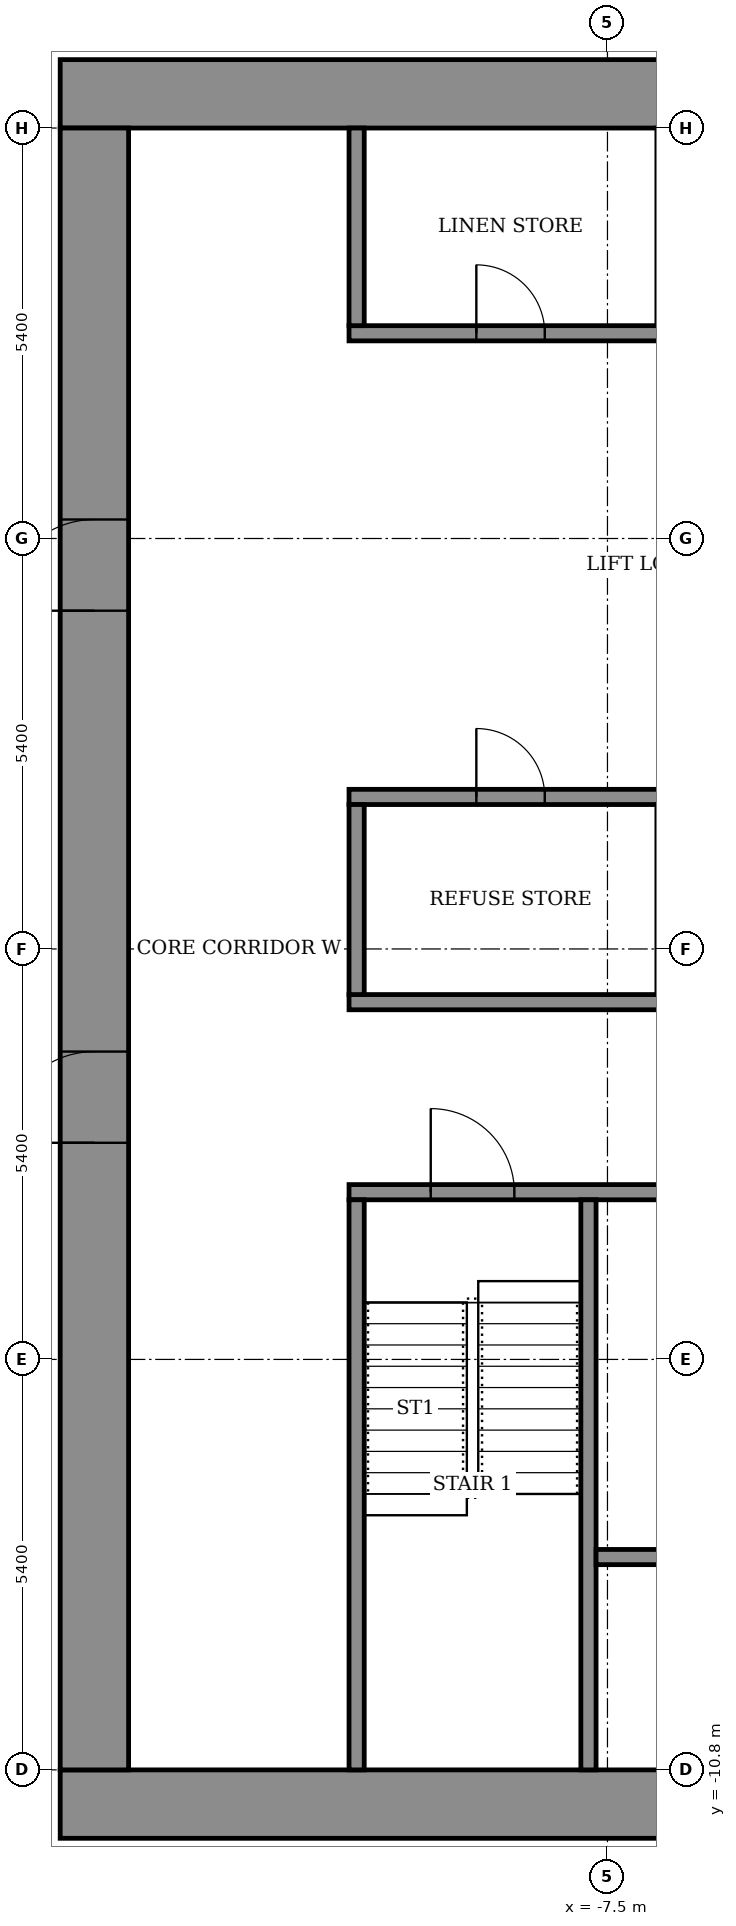
"""IFC4 building model, lengths in metres.
Left out: names, types, materials, properties, quantities, classifications, styles, units other than length and angle.
Written with IfcOpenShell. Run it as: python <this file> out.ifc"""

import sys

from ifc_helpers import new_model, si_unit, direction, frame, frame_2d, origin, place, context, subcontext, project, spatial, rectangle, extrude, element, fill, save


model = new_model("IFC4")
c1 = context("Model", 3, precision=1e-05, world=origin(), true_north=direction((0.0, 1.0)))
c2 = subcontext(c1, "Body", "Model", "MODEL_VIEW")
j1 = project(units=[si_unit("LENGTHUNIT", "METRE"), si_unit("PLANEANGLEUNIT", "RADIAN")], contexts=[c1])
p1 = place(None, origin())
s1 = spatial("IfcSite", under=j1, at=p1, CompositionType="ELEMENT")
p2 = place(p1, origin())
s2 = spatial("IfcBuilding", under=s1, at=p2, CompositionType="ELEMENT")
p3 = place(p2, frame((0.0, 0.0, 140.9)))
s3 = spatial("IfcBuildingStorey", under=s2, at=p3, CompositionType="ELEMENT", Elevation=140.9)
for number, where, z_axis, x_axis in (
    (1, (-14.7, -11.25, 0.0), (0.0, 0.0, 1.0), (1.0, 0.0, 0.0)),
    (2, (-14.7, 11.25, 0.0), (0.0, 0.0, 1.0), (1.0, 0.0, 0.0)),
):
    element("IfcWall", number, at=place(p3, frame(where, z_axis=z_axis, x_axis=x_axis)), inside=s3, PredefinedType="SHEAR", context=c2, shape_type="SweptSolid", body=[
        extrude(rectangle(XDim=29.4, YDim=0.9, at=frame_2d((14.7, 0.0))), origin(), (0.0, 0.0, 1.0), 3.6),
    ])
p4 = place(p3, frame((-14.25, -10.8, 0.0), z_axis=(0.0, 0.0, 1.0), x_axis=(0.0, 1.0, 0.0)))
e3 = element("IfcWall", 3, at=p4, inside=s3, PredefinedType="SHEAR", context=c2, shape_type="SweptSolid", body=[
    extrude(rectangle(XDim=21.6, YDim=0.9, at=frame_2d((10.8, 0.0))), origin(), (0.0, 0.0, 1.0), 3.6),
])
p5 = place(p4, frame((8.25, 0.0, 0.0)))
e4 = element("IfcOpeningElement", 4, at=p5, cuts=e3, PredefinedType="OPENING", context=c2, shape_type="SweptSolid", body=[
    extrude(rectangle(XDim=1.2, YDim=2.1, at=frame_2d((0.6, 1.05))), frame((0.0, 0.46, 0.0), z_axis=(0.0, -1.0, 0.0), x_axis=(1.0, 0.0, 0.0)), (0.0, 0.0, 1.0), 0.92),
])
p6 = place(p4, frame((15.25, 0.0, 0.0)))
e5 = element("IfcOpeningElement", 5, at=p6, cuts=e3, PredefinedType="OPENING", context=c2, shape_type="SweptSolid", body=[
    extrude(rectangle(XDim=1.2, YDim=2.1, at=frame_2d((0.6, 1.05))), frame((0.0, 0.46, 0.0), z_axis=(0.0, -1.0, 0.0), x_axis=(1.0, 0.0, 0.0)), (0.0, 0.0, 1.0), 0.92),
])
p7 = place(p3, frame((-10.9, -3.2, 0.0), z_axis=(0.0, 0.0, 1.0), x_axis=(1.0, 0.0, 0.0)))
e6 = element("IfcWall", 6, at=p7, inside=s3, PredefinedType="SHEAR", context=c2, shape_type="SweptSolid", body=[
    extrude(rectangle(XDim=21.8, YDim=0.2, at=frame_2d((10.9, 0.0))), origin(), (0.0, 0.0, 1.0), 3.05),
])
p8 = place(p7, frame((1.075, 0.0, 0.0)))
e7 = element("IfcOpeningElement", 7, at=p8, cuts=e6, PredefinedType="OPENING", context=c2, shape_type="SweptSolid", body=[
    extrude(rectangle(XDim=1.1, YDim=2.1, at=frame_2d((0.55, 1.05))), frame((0.0, 0.11, 0.0), z_axis=(0.0, -1.0, 0.0), x_axis=(1.0, 0.0, 0.0)), (0.0, 0.0, 1.0), 0.22),
])
p9 = place(p7, frame((10.325, 0.0, 0.0)))
e8 = element("IfcOpeningElement", 8, at=p9, cuts=e6, PredefinedType="OPENING", context=c2, shape_type="SweptSolid", body=[
    extrude(rectangle(XDim=1.1, YDim=2.1, at=frame_2d((0.55, 1.05))), frame((0.0, 0.11, 0.0), z_axis=(0.0, -1.0, 0.0), x_axis=(1.0, 0.0, 0.0)), (0.0, 0.0, 1.0), 0.22),
])
p10 = place(p7, frame((19.625, 0.0, 0.0)))
e9 = element("IfcOpeningElement", 9, at=p10, cuts=e6, PredefinedType="OPENING", context=c2, shape_type="SweptSolid", body=[
    extrude(rectangle(XDim=1.1, YDim=2.1, at=frame_2d((0.55, 1.05))), frame((0.0, 0.11, 0.0), z_axis=(0.0, -1.0, 0.0), x_axis=(1.0, 0.0, 0.0)), (0.0, 0.0, 1.0), 0.22),
])
p11 = place(p7, frame((5.7, 0.0, 0.0)))
e10 = element("IfcOpeningElement", 10, at=p11, cuts=e6, PredefinedType="OPENING", context=c2, shape_type="SweptSolid", body=[
    extrude(rectangle(XDim=1.1, YDim=2.1, at=frame_2d((0.55, 1.05))), frame((0.0, 0.11, 0.0), z_axis=(0.0, -1.0, 0.0), x_axis=(1.0, 0.0, 0.0)), (0.0, 0.0, 1.0), 0.22),
])
p12 = place(p7, frame((14.975, 0.0, 0.0)))
e11 = element("IfcOpeningElement", 11, at=p12, cuts=e6, PredefinedType="OPENING", context=c2, shape_type="SweptSolid", body=[
    extrude(rectangle(XDim=1.1, YDim=2.1, at=frame_2d((0.55, 1.05))), frame((0.0, 0.11, 0.0), z_axis=(0.0, -1.0, 0.0), x_axis=(1.0, 0.0, 0.0)), (0.0, 0.0, 1.0), 0.22),
])
p13 = place(p3, frame((-10.9, -0.7, 0.0), z_axis=(0.0, 0.0, 1.0), x_axis=(1.0, 0.0, 0.0)))
e12 = element("IfcWall", 12, at=p13, inside=s3, PredefinedType="SHEAR", context=c2, shape_type="SweptSolid", body=[
    extrude(rectangle(XDim=21.8, YDim=0.2, at=frame_2d((10.9, 0.0))), origin(), (0.0, 0.0, 1.0), 3.05),
])
p14 = place(p3, frame((-10.9, 2.0, 0.0), z_axis=(0.0, 0.0, 1.0), x_axis=(1.0, 0.0, 0.0)))
e13 = element("IfcWall", 13, at=p14, inside=s3, PredefinedType="SHEAR", context=c2, shape_type="SweptSolid", body=[
    extrude(rectangle(XDim=21.8, YDim=0.2, at=frame_2d((10.9, 0.0))), origin(), (0.0, 0.0, 1.0), 3.05),
])
p15 = place(p14, frame((14.4, 0.0, 0.0)))
e14 = element("IfcOpeningElement", 14, at=p15, cuts=e13, PredefinedType="OPENING", context=c2, shape_type="SweptSolid", body=[
    extrude(rectangle(XDim=1.1, YDim=2.1, at=frame_2d((0.55, 1.05))), frame((0.0, 0.11, 0.0), z_axis=(0.0, -1.0, 0.0), x_axis=(1.0, 0.0, 0.0)), (0.0, 0.0, 1.0), 0.22),
])
p16 = place(p14, frame((17.1, 0.0, 0.0)))
e15 = element("IfcOpeningElement", 15, at=p16, cuts=e13, PredefinedType="OPENING", context=c2, shape_type="SweptSolid", body=[
    extrude(rectangle(XDim=1.1, YDim=2.1, at=frame_2d((0.55, 1.05))), frame((0.0, 0.11, 0.0), z_axis=(0.0, -1.0, 0.0), x_axis=(1.0, 0.0, 0.0)), (0.0, 0.0, 1.0), 0.22),
])
p17 = place(p14, frame((19.8, 0.0, 0.0)))
e16 = element("IfcOpeningElement", 16, at=p17, cuts=e13, PredefinedType="OPENING", context=c2, shape_type="SweptSolid", body=[
    extrude(rectangle(XDim=1.1, YDim=2.1, at=frame_2d((0.55, 1.05))), frame((0.0, 0.11, 0.0), z_axis=(0.0, -1.0, 0.0), x_axis=(1.0, 0.0, 0.0)), (0.0, 0.0, 1.0), 0.22),
])
p18 = place(p14, frame((1.675, 0.0, 0.0)))
e17 = element("IfcOpeningElement", 17, at=p18, cuts=e13, PredefinedType="OPENING", context=c2, shape_type="SweptSolid", body=[
    extrude(rectangle(XDim=0.9, YDim=2.1, at=frame_2d((0.45, 1.05))), frame((0.0, 0.11, 0.0), z_axis=(0.0, -1.0, 0.0), x_axis=(1.0, 0.0, 0.0)), (0.0, 0.0, 1.0), 0.22),
])
p19 = place(p14, frame((8.425, 0.0, 0.0)))
e18 = element("IfcOpeningElement", 18, at=p19, cuts=e13, PredefinedType="OPENING", context=c2, shape_type="SweptSolid", body=[
    extrude(rectangle(XDim=0.9, YDim=2.1, at=frame_2d((0.45, 1.05))), frame((0.0, 0.11, 0.0), z_axis=(0.0, -1.0, 0.0), x_axis=(1.0, 0.0, 0.0)), (0.0, 0.0, 1.0), 0.22),
])
p20 = place(p3, frame((-10.9, 8.1, 0.0), z_axis=(0.0, 0.0, 1.0), x_axis=(1.0, 0.0, 0.0)))
e19 = element("IfcWall", 19, at=p20, inside=s3, PredefinedType="SHEAR", context=c2, shape_type="SweptSolid", body=[
    extrude(rectangle(XDim=21.8, YDim=0.2, at=frame_2d((10.9, 0.0))), origin(), (0.0, 0.0, 1.0), 3.05),
])
p21 = place(p20, frame((14.4, 0.0, 0.0)))
e20 = element("IfcOpeningElement", 20, at=p21, cuts=e19, PredefinedType="OPENING", context=c2, shape_type="SweptSolid", body=[
    extrude(rectangle(XDim=1.1, YDim=2.1, at=frame_2d((0.55, 1.05))), frame((0.0, 0.11, 0.0), z_axis=(0.0, -1.0, 0.0), x_axis=(1.0, 0.0, 0.0)), (0.0, 0.0, 1.0), 0.22),
])
p22 = place(p20, frame((17.1, 0.0, 0.0)))
e21 = element("IfcOpeningElement", 21, at=p22, cuts=e19, PredefinedType="OPENING", context=c2, shape_type="SweptSolid", body=[
    extrude(rectangle(XDim=1.1, YDim=2.1, at=frame_2d((0.55, 1.05))), frame((0.0, 0.11, 0.0), z_axis=(0.0, -1.0, 0.0), x_axis=(1.0, 0.0, 0.0)), (0.0, 0.0, 1.0), 0.22),
])
p23 = place(p20, frame((19.8, 0.0, 0.0)))
e22 = element("IfcOpeningElement", 22, at=p23, cuts=e19, PredefinedType="OPENING", context=c2, shape_type="SweptSolid", body=[
    extrude(rectangle(XDim=1.1, YDim=2.1, at=frame_2d((0.55, 1.05))), frame((0.0, 0.11, 0.0), z_axis=(0.0, -1.0, 0.0), x_axis=(1.0, 0.0, 0.0)), (0.0, 0.0, 1.0), 0.22),
])
p24 = place(p20, frame((1.675, 0.0, 0.0)))
e23 = element("IfcOpeningElement", 23, at=p24, cuts=e19, PredefinedType="OPENING", context=c2, shape_type="SweptSolid", body=[
    extrude(rectangle(XDim=0.9, YDim=2.1, at=frame_2d((0.45, 1.05))), frame((0.0, 0.11, 0.0), z_axis=(0.0, -1.0, 0.0), x_axis=(1.0, 0.0, 0.0)), (0.0, 0.0, 1.0), 0.22),
])
p25 = place(p20, frame((8.425, 0.0, 0.0)))
e24 = element("IfcOpeningElement", 24, at=p25, cuts=e19, PredefinedType="OPENING", context=c2, shape_type="SweptSolid", body=[
    extrude(rectangle(XDim=0.9, YDim=2.1, at=frame_2d((0.45, 1.05))), frame((0.0, 0.11, 0.0), z_axis=(0.0, -1.0, 0.0), x_axis=(1.0, 0.0, 0.0)), (0.0, 0.0, 1.0), 0.22),
])
for number, where, z_axis, x_axis in (
    (25, (-10.8, -10.8, 0.0), (0.0, 0.0, 1.0), (0.0, 1.0, 0.0)),
    (26, (-7.75, -10.8, 0.0), (0.0, 0.0, 1.0), (0.0, 1.0, 0.0)),
):
    element("IfcWall", number, at=place(p3, frame(where, z_axis=z_axis, x_axis=x_axis)), inside=s3, PredefinedType="SHEAR", context=c2, shape_type="SweptSolid", body=[
        extrude(rectangle(XDim=7.5, YDim=0.2, at=frame_2d((3.75, 0.0))), origin(), (0.0, 0.0, 1.0), 3.05),
    ])
p26 = place(p3, frame((-7.65, -8.0, 0.0), z_axis=(0.0, 0.0, 1.0), x_axis=(1.0, 0.0, 0.0)))
e27 = element("IfcWall", 27, at=p26, inside=s3, PredefinedType="SHEAR", context=c2, shape_type="SweptSolid", body=[
    extrude(rectangle(XDim=6.0, YDim=0.2, at=frame_2d((3.0, 0.0))), origin(), (0.0, 0.0, 1.0), 3.05),
])
p27 = place(p26, frame((0.9, 0.0, 0.0)))
e28 = element("IfcOpeningElement", 28, at=p27, cuts=e27, PredefinedType="OPENING", context=c2, shape_type="SweptSolid", body=[
    extrude(rectangle(XDim=1.1, YDim=2.1, at=frame_2d((0.55, 1.05))), frame((0.0, 0.11, 0.0), z_axis=(0.0, -1.0, 0.0), x_axis=(1.0, 0.0, 0.0)), (0.0, 0.0, 1.0), 0.22),
])
p28 = place(p26, frame((4.0, 0.0, 0.0)))
e29 = element("IfcOpeningElement", 29, at=p28, cuts=e27, PredefinedType="OPENING", context=c2, shape_type="SweptSolid", body=[
    extrude(rectangle(XDim=1.1, YDim=2.1, at=frame_2d((0.55, 1.05))), frame((0.0, 0.11, 0.0), z_axis=(0.0, -1.0, 0.0), x_axis=(1.0, 0.0, 0.0)), (0.0, 0.0, 1.0), 0.22),
])
p29 = place(p3, frame((-10.8, -0.6, 0.0), z_axis=(0.0, 0.0, 1.0), x_axis=(0.0, 1.0, 0.0)))
e30 = element("IfcWall", 30, at=p29, inside=s3, PredefinedType="STANDARD", context=c2, shape_type="SweptSolid", body=[
    extrude(rectangle(XDim=2.5, YDim=0.2, at=frame_2d((1.25, 0.0))), origin(), (0.0, 0.0, 1.0), 3.05),
])
p30 = place(p3, frame((-10.8, 8.2, 0.0), z_axis=(0.0, 0.0, 1.0), x_axis=(0.0, 1.0, 0.0)))
e31 = element("IfcWall", 31, at=p30, inside=s3, PredefinedType="STANDARD", context=c2, shape_type="SweptSolid", body=[
    extrude(rectangle(XDim=2.6, YDim=0.2, at=frame_2d((1.3, 0.0))), origin(), (0.0, 0.0, 1.0), 3.05),
])
p31 = place(p5, origin())
e32 = element("IfcDoor", 32, at=p31, inside=s3, OperationType="DOUBLE_DOOR_SINGLE_SWING", PredefinedType="DOOR", context=c2, shape_type="SweptSolid", body=[
    extrude(rectangle(XDim=1.2, YDim=2.1, at=frame_2d((0.6, 1.05))), frame((0.0, 0.025, 0.0), z_axis=(0.0, -1.0, 0.0), x_axis=(1.0, 0.0, 0.0)), (0.0, 0.0, 1.0), 0.05),
])
fill(e4, e32)
p32 = place(p6, origin())
e33 = element("IfcDoor", 33, at=p32, inside=s3, OperationType="DOUBLE_DOOR_SINGLE_SWING", PredefinedType="DOOR", context=c2, shape_type="SweptSolid", body=[
    extrude(rectangle(XDim=1.2, YDim=2.1, at=frame_2d((0.6, 1.05))), frame((0.0, 0.025, 0.0), z_axis=(0.0, -1.0, 0.0), x_axis=(1.0, 0.0, 0.0)), (0.0, 0.0, 1.0), 0.05),
])
fill(e5, e33)
p33 = place(p18, origin())
e34 = element("IfcDoor", 34, at=p33, inside=s3, OperationType="SINGLE_SWING_RIGHT", PredefinedType="DOOR", context=c2, shape_type="SweptSolid", body=[
    extrude(rectangle(XDim=0.9, YDim=2.1, at=frame_2d((0.45, 1.05))), frame((0.0, 0.025, 0.0), z_axis=(0.0, -1.0, 0.0), x_axis=(1.0, 0.0, 0.0)), (0.0, 0.0, 1.0), 0.05),
])
fill(e17, e34)
p34 = place(p24, origin())
e35 = element("IfcDoor", 35, at=p34, inside=s3, OperationType="SINGLE_SWING_RIGHT", PredefinedType="DOOR", context=c2, shape_type="SweptSolid", body=[
    extrude(rectangle(XDim=0.9, YDim=2.1, at=frame_2d((0.45, 1.05))), frame((0.0, 0.025, 0.0), z_axis=(0.0, -1.0, 0.0), x_axis=(1.0, 0.0, 0.0)), (0.0, 0.0, 1.0), 0.05),
])
fill(e23, e35)
p35 = place(p8, origin())
e36 = element("IfcDoor", 36, at=p35, inside=s3, OperationType="SINGLE_SWING_RIGHT", PredefinedType="DOOR", context=c2, shape_type="SweptSolid", body=[
    extrude(rectangle(XDim=1.1, YDim=2.1, at=frame_2d((0.55, 1.05))), frame((0.0, 0.025, 0.0), z_axis=(0.0, -1.0, 0.0), x_axis=(1.0, 0.0, 0.0)), (0.0, 0.0, 1.0), 0.05),
])
fill(e7, e36)
save(model, sys.argv[1])
